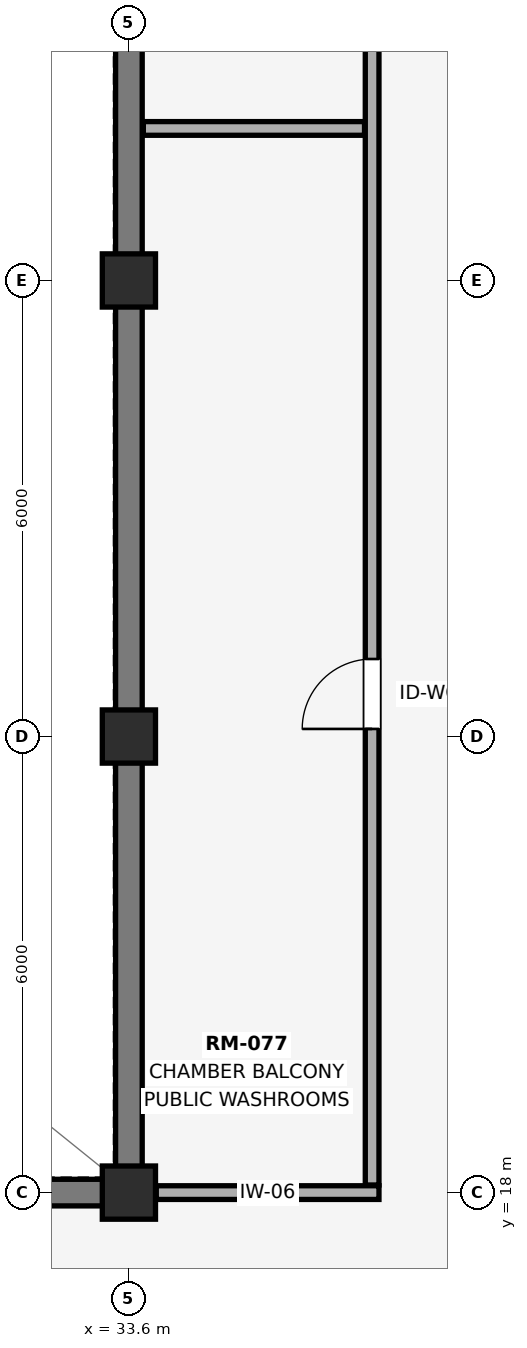
"""IFC4 building model, lengths in metres.
Left out: names, types, materials, properties, quantities, classifications, styles, units other than length and angle.
Written with IfcOpenShell. Run it as: python <this file> out.ifc"""

import sys

from ifc_helpers import new_model, si_unit, direction, frame, frame_2d, origin, origin_2d, place, context, subcontext, project, spatial, rectangle, extrude, element, fill, save


model = new_model("IFC4")
c1 = context("Model", 3, precision=1e-05, world=origin(), true_north=direction((0.0, 1.0)))
c2 = subcontext(c1, "Body", "Model", "MODEL_VIEW")
j1 = project(units=[si_unit("LENGTHUNIT", "METRE"), si_unit("PLANEANGLEUNIT", "RADIAN")], contexts=[c1])
p1 = place(None, origin())
s1 = spatial("IfcSite", under=j1, at=p1, CompositionType="ELEMENT")
p2 = place(p1, origin())
s2 = spatial("IfcBuilding", under=s1, at=p2, CompositionType="ELEMENT")
p3 = place(p2, frame((0.0, 0.0, 5.4)))
s3 = spatial("IfcBuildingStorey", under=s2, at=p3, CompositionType="ELEMENT", Elevation=5.4)
for number, where, z_axis, x_axis in (
    (1, (33.6, 18.0, 0.0), (0.0, 0.0, 1.0), (1.0, 0.0, 0.0)),
    (2, (33.6, 24.0, 0.0), (0.0, 0.0, 1.0), (1.0, 0.0, 0.0)),
    (3, (33.6, 30.0, 0.0), (0.0, 0.0, 1.0), (1.0, 0.0, 0.0)),
):
    element("IfcColumn", number, at=place(p3, frame(where, z_axis=z_axis, x_axis=x_axis)), inside=s3, PredefinedType="COLUMN", context=c2, shape_type="SweptSolid", body=[
        extrude(rectangle(XDim=0.7, YDim=0.7, at=origin_2d()), origin(), (0.0, 0.0, 1.0), 4.8),
    ])
p4 = place(p3, frame((8.225, 18.0, 0.0), z_axis=(0.0, 0.0, 1.0), x_axis=(1.0, 0.0, 0.0)))
e4 = element("IfcWall", 4, at=p4, inside=s3, PredefinedType="SHEAR", context=c2, shape_type="SweptSolid", body=[
    extrude(rectangle(XDim=25.55, YDim=0.35, at=frame_2d((12.775, 0.0))), origin(), (0.0, 0.0, 1.0), 4.8),
])
p5 = place(p4, frame((9.6, 0.0, 0.0)))
e5 = element("IfcOpeningElement", 5, at=p5, cuts=e4, PredefinedType="OPENING", context=c2, shape_type="SweptSolid", body=[
    extrude(rectangle(XDim=2.0, YDim=2.45, at=frame_2d((1.0, 1.225))), frame((0.0, 0.185, 0.0), z_axis=(0.0, -1.0, 0.0), x_axis=(1.0, 0.0, 0.0)), (0.0, 0.0, 1.0), 0.37),
])
p6 = place(p3, frame((33.6, 18.175, 0.0), z_axis=(0.0, 0.0, 1.0), x_axis=(0.0, 1.0, 0.0)))
e6 = element("IfcWall", 6, at=p6, inside=s3, PredefinedType="SHEAR", context=c2, shape_type="SweptSolid", body=[
    extrude(rectangle(XDim=20.05, YDim=0.35, at=frame_2d((10.025, 0.0))), origin(), (0.0, 0.0, 1.0), 4.8),
])
p7 = place(p3, frame((33.96, 18.0, 0.0), z_axis=(0.0, 0.0, 1.0), x_axis=(1.0, 0.0, 0.0)))
e7 = element("IfcWall", 7, at=p7, inside=s3, PredefinedType="PARTITIONING", context=c2, shape_type="SweptSolid", body=[
    extrude(rectangle(XDim=2.93, YDim=0.18, at=frame_2d((1.465, 0.0))), origin(), (0.0, 0.0, 1.0), 4.064),
])
p8 = place(p3, frame((33.79, 32.0, 0.0), z_axis=(0.0, 0.0, 1.0), x_axis=(1.0, 0.0, 0.0)))
e8 = element("IfcWall", 8, at=p8, inside=s3, PredefinedType="PARTITIONING", context=c2, shape_type="SweptSolid", body=[
    extrude(rectangle(XDim=2.91, YDim=0.18, at=frame_2d((1.455, 0.0))), origin(), (0.0, 0.0, 1.0), 4.49),
])
p9 = place(p3, frame((36.8, 18.1, 0.0), z_axis=(0.0, 0.0, 1.0), x_axis=(0.0, 1.0, 0.0)))
e9 = element("IfcWall", 9, at=p9, inside=s3, PredefinedType="PARTITIONING", context=c2, shape_type="SweptSolid", body=[
    extrude(rectangle(XDim=20.2, YDim=0.18, at=frame_2d((10.1, 0.0))), origin(), (0.0, 0.0, 1.0), 4.49),
])
p10 = place(p9, frame((6.0, 0.0, 0.0)))
e10 = element("IfcOpeningElement", 10, at=p10, cuts=e9, PredefinedType="OPENING", context=c2, shape_type="SweptSolid", body=[
    extrude(rectangle(XDim=0.92, YDim=2.15, at=frame_2d((0.46, 1.075))), frame((0.0, 0.1, 0.0), z_axis=(0.0, -1.0, 0.0), x_axis=(1.0, 0.0, 0.0)), (0.0, 0.0, 1.0), 0.2),
])
p11 = place(p9, frame((15.0, 0.0, 0.0)))
e11 = element("IfcOpeningElement", 11, at=p11, cuts=e9, PredefinedType="OPENING", context=c2, shape_type="SweptSolid", body=[
    extrude(rectangle(XDim=0.92, YDim=2.15, at=frame_2d((0.46, 1.075))), frame((0.0, 0.1, 0.0), z_axis=(0.0, -1.0, 0.0), x_axis=(1.0, 0.0, 0.0)), (0.0, 0.0, 1.0), 0.2),
])
p12 = place(p10, origin())
e12 = element("IfcDoor", 12, at=p12, inside=s3, OperationType="SINGLE_SWING_LEFT", PredefinedType="DOOR", context=c2, shape_type="SweptSolid", body=[
    extrude(rectangle(XDim=0.92, YDim=2.15, at=frame_2d((0.46, 1.075))), frame((0.0, 0.025, 0.0), z_axis=(0.0, -1.0, 0.0), x_axis=(1.0, 0.0, 0.0)), (0.0, 0.0, 1.0), 0.05),
])
fill(e10, e12)
save(model, sys.argv[1])
